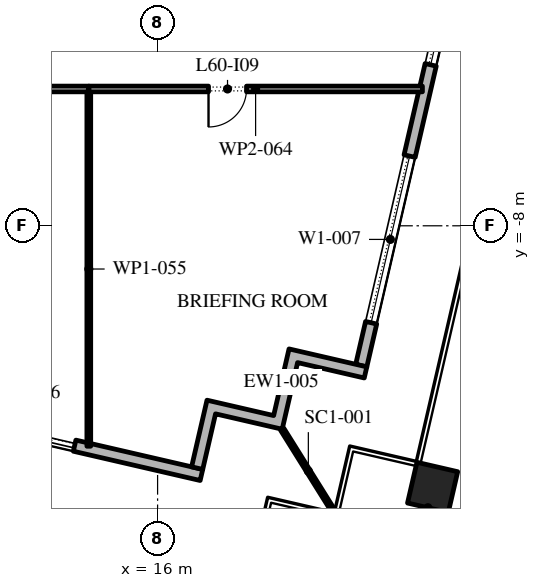
"""IFC4 building model, lengths in metres.
Left out: names, types, materials, properties, quantities, classifications, styles, units other than length and angle.
Written with IfcOpenShell. Run it as: python <this file> out.ifc"""

import sys

from ifc_helpers import new_model, si_unit, direction, frame, frame_2d, origin, origin_2d, place, context, subcontext, project, spatial, polyline, rectangle, outline, extrude, element, fill, save


model = new_model("IFC4")
c1 = context("Model", 3, precision=1e-05, world=origin(), true_north=direction((0.0, 1.0)))
c2 = subcontext(c1, "Body", "Model", "MODEL_VIEW")
j1 = project(units=[si_unit("LENGTHUNIT", "METRE"), si_unit("PLANEANGLEUNIT", "RADIAN")], contexts=[c1])
p1 = place(None, origin())
s1 = spatial("IfcSite", under=j1, at=p1, CompositionType="ELEMENT")
p2 = place(p1, origin())
s2 = spatial("IfcBuilding", under=s1, at=p2, CompositionType="ELEMENT")
p3 = place(p2, frame((0.0, 0.0, 276.6)))
s3 = spatial("IfcBuildingStorey", under=s2, at=p3, CompositionType="ELEMENT", Elevation=276.6)
p4 = place(p3, frame((23.236, -14.883, 0.0), z_axis=(0.0, 0.0, 1.0), x_axis=(0.974370064785, -0.224951054344, 0.0)))
e1 = element("IfcColumn", 1, at=p4, inside=s3, PredefinedType="COLUMN", context=c2, shape_type="SweptSolid", body=[
    extrude(rectangle(XDim=1.1, YDim=1.1, at=origin_2d()), origin(), (0.0, 0.0, 1.0), 4.2),
])
p5 = place(p3, frame((-29.616, -3.758, 0.0), z_axis=(0.0, 0.0, 1.0), x_axis=(0.974370532314, -0.224949029246, 0.0)))
e2 = element("IfcWall", 2, at=p5, inside=s3, PredefinedType="STANDARD", context=c2, shape_type="SweptSolid", body=[
    extrude(rectangle(XDim=48.0, YDim=0.3, at=frame_2d((24.0, 0.0))), origin(), (0.0, 0.0, 1.0), 4.0),
])
p6 = place(p5, frame((1.625, 0.0, 0.45)))
e3 = element("IfcOpeningElement", 3, at=p6, cuts=e2, PredefinedType="OPENING", context=c2, shape_type="SweptSolid", body=[
    extrude(rectangle(XDim=4.5, YDim=3.05, at=frame_2d((2.25, 1.525))), frame((0.0, 0.16, 0.0), z_axis=(0.0, -1.0, 0.0), x_axis=(1.0, 0.0, 0.0)), (0.0, 0.0, 1.0), 0.32),
])
p7 = place(p5, frame((10.575, 0.0, 0.0)))
e4 = element("IfcOpeningElement", 4, at=p7, cuts=e2, PredefinedType="OPENING", context=c2, shape_type="SweptSolid", body=[
    extrude(rectangle(XDim=2.4, YDim=3.5, at=frame_2d((1.2, 1.75))), frame((0.0, 0.16, 0.0), z_axis=(0.0, -1.0, 0.0), x_axis=(1.0, 0.0, 0.0)), (0.0, 0.0, 1.0), 0.32),
])
p8 = place(p5, frame((17.575, 0.0, 0.45)))
e5 = element("IfcOpeningElement", 5, at=p8, cuts=e2, PredefinedType="OPENING", context=c2, shape_type="SweptSolid", body=[
    extrude(rectangle(XDim=4.5, YDim=3.0, at=frame_2d((2.25, 1.5))), frame((0.0, 0.16, 0.0), z_axis=(0.0, -1.0, 0.0), x_axis=(1.0, 0.0, 0.0)), (0.0, 0.0, 1.0), 0.32),
])
p9 = place(p5, frame((25.625, 0.0, 0.45)))
e6 = element("IfcOpeningElement", 6, at=p9, cuts=e2, PredefinedType="OPENING", context=c2, shape_type="SweptSolid", body=[
    extrude(rectangle(XDim=4.5, YDim=2.95, at=frame_2d((2.25, 1.475))), frame((0.0, 0.16, 0.0), z_axis=(0.0, -1.0, 0.0), x_axis=(1.0, 0.0, 0.0)), (0.0, 0.0, 1.0), 0.32),
])
p10 = place(p5, frame((33.675, 0.0, 0.45)))
e7 = element("IfcOpeningElement", 7, at=p10, cuts=e2, PredefinedType="OPENING", context=c2, shape_type="SweptSolid", body=[
    extrude(rectangle(XDim=4.5, YDim=2.825, at=frame_2d((2.25, 1.413))), frame((0.0, 0.16, 0.0), z_axis=(0.0, -1.0, 0.0), x_axis=(1.0, 0.0, 0.0)), (0.0, 0.0, 1.0), 0.32),
])
p11 = place(p5, frame((42.175, 0.0, 0.0)))
e8 = element("IfcOpeningElement", 8, at=p11, cuts=e2, PredefinedType="OPENING", context=c2, shape_type="SweptSolid", body=[
    extrude(rectangle(XDim=2.4, YDim=3.5, at=frame_2d((1.2, 1.75))), frame((0.0, 0.16, 0.0), z_axis=(0.0, -1.0, 0.0), x_axis=(1.0, 0.0, 0.0)), (0.0, 0.0, 1.0), 0.32),
])
p12 = place(p3, frame((21.359, -11.678, 0.0), z_axis=(0.0, 0.0, 1.0), x_axis=(0.224949198343, 0.974370493275, 0.0)))
e9 = element("IfcWall", 9, at=p12, inside=s3, PredefinedType="STANDARD", context=c2, shape_type="SweptSolid", body=[
    extrude(rectangle(XDim=49.5, YDim=0.3, at=frame_2d((24.75, 0.0))), origin(), (0.0, 0.0, 1.0), 4.0),
])
p13 = place(p12, frame((1.157, 0.0, 0.45)))
e10 = element("IfcOpeningElement", 10, at=p13, cuts=e9, PredefinedType="OPENING", context=c2, shape_type="SweptSolid", body=[
    extrude(rectangle(XDim=4.5, YDim=3.05, at=frame_2d((2.25, 1.525))), frame((0.0, 0.16, 0.0), z_axis=(0.0, -1.0, 0.0), x_axis=(1.0, 0.0, 0.0)), (0.0, 0.0, 1.0), 0.32),
])
p14 = place(p12, frame((8.121, 0.0, 0.45)))
e11 = element("IfcOpeningElement", 11, at=p14, cuts=e9, PredefinedType="OPENING", context=c2, shape_type="SweptSolid", body=[
    extrude(rectangle(XDim=4.5, YDim=3.05, at=frame_2d((2.25, 1.525))), frame((0.0, 0.16, 0.0), z_axis=(0.0, -1.0, 0.0), x_axis=(1.0, 0.0, 0.0)), (0.0, 0.0, 1.0), 0.32),
])
p15 = place(p12, frame((15.236, 0.0, 0.45)))
e12 = element("IfcOpeningElement", 12, at=p15, cuts=e9, PredefinedType="OPENING", context=c2, shape_type="SweptSolid", body=[
    extrude(rectangle(XDim=4.5, YDim=3.05, at=frame_2d((2.25, 1.525))), frame((0.0, 0.16, 0.0), z_axis=(0.0, -1.0, 0.0), x_axis=(1.0, 0.0, 0.0)), (0.0, 0.0, 1.0), 0.32),
])
p16 = place(p12, frame((22.35, 0.0, 0.45)))
e13 = element("IfcOpeningElement", 13, at=p16, cuts=e9, PredefinedType="OPENING", context=c2, shape_type="SweptSolid", body=[
    extrude(rectangle(XDim=4.5, YDim=3.05, at=frame_2d((2.25, 1.525))), frame((0.0, 0.16, 0.0), z_axis=(0.0, -1.0, 0.0), x_axis=(1.0, 0.0, 0.0)), (0.0, 0.0, 1.0), 0.32),
])
p17 = place(p12, frame((29.464, 0.0, 0.45)))
e14 = element("IfcOpeningElement", 14, at=p17, cuts=e9, PredefinedType="OPENING", context=c2, shape_type="SweptSolid", body=[
    extrude(rectangle(XDim=4.5, YDim=2.95, at=frame_2d((2.25, 1.475))), frame((0.0, 0.16, 0.0), z_axis=(0.0, -1.0, 0.0), x_axis=(1.0, 0.0, 0.0)), (0.0, 0.0, 1.0), 0.32),
])
p18 = place(p12, frame((37.628, 0.0, 0.0)))
e15 = element("IfcOpeningElement", 15, at=p18, cuts=e9, PredefinedType="OPENING", context=c2, shape_type="SweptSolid", body=[
    extrude(rectangle(XDim=2.4, YDim=3.325, at=frame_2d((1.2, 1.663))), frame((0.0, 0.16, 0.0), z_axis=(0.0, -1.0, 0.0), x_axis=(1.0, 0.0, 0.0)), (0.0, 0.0, 1.0), 0.32),
])
p19 = place(p12, frame((43.693, 0.0, 0.45)))
e16 = element("IfcOpeningElement", 16, at=p19, cuts=e9, PredefinedType="OPENING", context=c2, shape_type="SweptSolid", body=[
    extrude(rectangle(XDim=4.5, YDim=3.05, at=frame_2d((2.25, 1.525))), frame((0.0, 0.16, 0.0), z_axis=(0.0, -1.0, 0.0), x_axis=(1.0, 0.0, 0.0)), (0.0, 0.0, 1.0), 0.32),
])
p20 = place(p3, origin())
e17 = element("IfcWall", 17, at=p20, inside=s3, PredefinedType="STANDARD", context=c2, shape_type="SweptSolid", body=[
    extrude(outline(polyline([(19.054, -12.993), (19.459, -11.24), (21.505, -11.712), (21.438, -12.004), (19.684, -11.599), (19.279, -13.353), (17.525, -12.948), (17.188, -14.41), (16.895, -14.342), (17.3, -12.588), (19.054, -12.993)])), origin(), (0.0, 0.0, 1.0), 4.0),
])
p21 = place(p3, frame((19.279, -13.353, -0.05), z_axis=(0.0, 0.0, 1.0), x_axis=(0.529914407191, -0.848051131154, 0.0)))
e18 = element("IfcWall", 18, at=p21, inside=s3, PredefinedType="STANDARD", context=c2, shape_type="SweptSolid", body=[
    extrude(rectangle(XDim=2.596, YDim=0.1, at=frame_2d((1.298, 0.0))), origin(), (0.0, 0.0, 1.0), 4.05),
])
p22 = place(p3, frame((14.19, -4.4, 0.0), z_axis=(0.0, 0.0, 1.0), x_axis=(-1.0, 0.0, 0.0)))
e19 = element("IfcWall", 19, at=p22, inside=s3, PredefinedType="PARTITIONING", context=c2, shape_type="SweptSolid", body=[
    extrude(rectangle(XDim=4.115, YDim=0.15, at=frame_2d((2.058, 0.0))), origin(), (0.0, 0.0, 1.0), 4.0),
])
p23 = place(p3, frame((14.19, -4.475, 0.0), z_axis=(0.0, 0.0, 1.0), x_axis=(0.0, -1.0, 0.0)))
e20 = element("IfcWall", 20, at=p23, inside=s3, PredefinedType="PARTITIONING", context=c2, shape_type="SweptSolid", body=[
    extrude(rectangle(XDim=9.325, YDim=0.1, at=frame_2d((4.663, 0.0))), origin(), (0.0, 0.0, 1.0), 4.0),
])
p24 = place(p3, frame((22.968, -4.4, 0.0), z_axis=(0.0, 0.0, 1.0), x_axis=(-1.0, 0.0, 0.0)))
e21 = element("IfcWall", 21, at=p24, inside=s3, PredefinedType="PARTITIONING", context=c2, shape_type="SweptSolid", body=[
    extrude(rectangle(XDim=8.778, YDim=0.15, at=frame_2d((4.389, 0.0))), origin(), (0.0, 0.0, 1.0), 4.0),
])
p25 = place(p24, frame((4.628, 0.0, 0.0)))
e22 = element("IfcOpeningElement", 22, at=p25, cuts=e21, PredefinedType="OPENING", context=c2, shape_type="SweptSolid", body=[
    extrude(rectangle(XDim=1.0, YDim=2.1, at=frame_2d((0.5, 1.05))), frame((0.0, 0.085, 0.0), z_axis=(0.0, -1.0, 0.0), x_axis=(1.0, 0.0, 0.0)), (0.0, 0.0, 1.0), 0.17),
])
p26 = place(p11, origin())
e23 = element("IfcDoor", 23, at=p26, inside=s3, OperationType="DOUBLE_DOOR_SLIDING", PredefinedType="DOOR", context=c2, shape_type="SweptSolid", body=[
    extrude(rectangle(XDim=2.4, YDim=3.5, at=frame_2d((1.2, 1.75))), frame((0.0, 0.025, 0.0), z_axis=(0.0, -1.0, 0.0), x_axis=(1.0, 0.0, 0.0)), (0.0, 0.0, 1.0), 0.05),
])
fill(e8, e23)
p27 = place(p13, origin())
e24 = element("IfcWindow", 24, at=p27, inside=s3, PartitioningType="DOUBLE_PANEL_VERTICAL", PredefinedType="WINDOW", context=c2, shape_type="SweptSolid", body=[
    extrude(rectangle(XDim=4.5, YDim=3.05, at=frame_2d((2.25, 1.525))), frame((0.0, 0.03, 0.0), z_axis=(0.0, -1.0, 0.0), x_axis=(1.0, 0.0, 0.0)), (0.0, 0.0, 1.0), 0.06),
])
fill(e10, e24)
p28 = place(p14, origin())
e25 = element("IfcWindow", 25, at=p28, inside=s3, PartitioningType="DOUBLE_PANEL_VERTICAL", PredefinedType="WINDOW", context=c2, shape_type="SweptSolid", body=[
    extrude(rectangle(XDim=4.5, YDim=3.05, at=frame_2d((2.25, 1.525))), frame((0.0, 0.03, 0.0), z_axis=(0.0, -1.0, 0.0), x_axis=(1.0, 0.0, 0.0)), (0.0, 0.0, 1.0), 0.06),
])
fill(e11, e25)
p29 = place(p25, origin())
e26 = element("IfcDoor", 26, at=p29, inside=s3, OperationType="SINGLE_SWING_LEFT", PredefinedType="DOOR", context=c2, shape_type="SweptSolid", body=[
    extrude(rectangle(XDim=1.0, YDim=2.1, at=frame_2d((0.5, 1.05))), frame((0.0, 0.025, 0.0), z_axis=(0.0, -1.0, 0.0), x_axis=(1.0, 0.0, 0.0)), (0.0, 0.0, 1.0), 0.05),
])
fill(e22, e26)
save(model, sys.argv[1])
